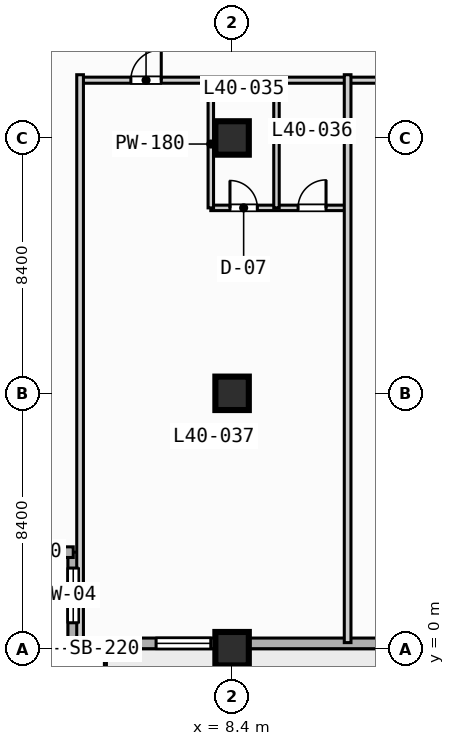
"""IFC4 building model, lengths in metres.
Left out: names, types, materials, properties, quantities, classifications, styles, units other than length and angle.
Written with IfcOpenShell. Run it as: python <this file> out.ifc"""

import sys

from ifc_helpers import new_model, si_unit, direction, frame, frame_2d, origin, origin_2d, place, context, subcontext, project, spatial, rectangle, extrude, element, fill, save


model = new_model("IFC4")
c1 = context("Model", 3, precision=1e-05, world=origin(), true_north=direction((0.0, 1.0)))
c2 = subcontext(c1, "Body", "Model", "MODEL_VIEW")
j1 = project(units=[si_unit("LENGTHUNIT", "METRE"), si_unit("PLANEANGLEUNIT", "RADIAN")], contexts=[c1])
p1 = place(None, origin())
s1 = spatial("IfcSite", under=j1, at=p1, CompositionType="ELEMENT")
p2 = place(p1, origin())
s2 = spatial("IfcBuilding", under=s1, at=p2, CompositionType="ELEMENT")
p3 = place(p2, frame((0.0, 0.0, 168.0)))
s3 = spatial("IfcBuildingStorey", under=s2, at=p3, CompositionType="ELEMENT", Elevation=168.0)
for number, where, z_axis, x_axis in (
    (1, (8.4, 0.0, 0.0), (0.0, 0.0, 1.0), (1.0, 0.0, 0.0)),
    (2, (8.4, 8.4, 0.0), (0.0, 0.0, 1.0), (1.0, 0.0, 0.0)),
    (3, (8.4, 16.8, 0.0), (0.0, 0.0, 1.0), (1.0, 0.0, 0.0)),
):
    element("IfcColumn", number, at=place(p3, frame(where, z_axis=z_axis, x_axis=x_axis)), inside=s3, PredefinedType="COLUMN", context=c2, shape_type="SweptSolid", body=[
        extrude(rectangle(XDim=1.1, YDim=1.1, at=origin_2d()), origin(), (0.0, 0.0, 1.0), 3.7),
    ])
p4 = place(p3, frame((3.175, 0.175, 0.0), z_axis=(0.0, 0.0, 1.0), x_axis=(0.0, 1.0, 0.0)))
e4 = element("IfcWall", 4, at=p4, inside=s3, PredefinedType="STANDARD", context=c2, shape_type="SweptSolid", body=[
    extrude(rectangle(XDim=3.0, YDim=0.35, at=frame_2d((1.5, 0.0))), origin(), (0.0, 0.0, 1.0), 3.47),
])
p5 = place(p4, frame((0.677, 0.0, 0.85)))
e5 = element("IfcOpeningElement", 5, at=p5, cuts=e4, PredefinedType="OPENING", context=c2, shape_type="SweptSolid", body=[
    extrude(rectangle(XDim=1.8, YDim=1.8, at=frame_2d((0.9, 0.9))), frame((0.0, 0.185, 0.0), z_axis=(0.0, -1.0, 0.0), x_axis=(1.0, 0.0, 0.0)), (0.0, 0.0, 1.0), 0.37),
])
p6 = place(p3, frame((3.175, 3.175, 0.0), z_axis=(0.0, 0.0, 1.0), x_axis=(-1.0, 0.0, 0.0)))
e6 = element("IfcWall", 6, at=p6, inside=s3, PredefinedType="STANDARD", context=c2, shape_type="SweptSolid", body=[
    extrude(rectangle(XDim=3.0, YDim=0.35, at=frame_2d((1.5, 0.0))), origin(), (0.0, 0.0, 1.0), 3.47),
])
p7 = place(p3, frame((72.425, 0.175, 0.0), z_axis=(0.0, 0.0, 1.0), x_axis=(-1.0, 0.0, 0.0)))
e7 = element("IfcWall", 7, at=p7, inside=s3, PredefinedType="STANDARD", context=c2, shape_type="SweptSolid", body=[
    extrude(rectangle(XDim=69.25, YDim=0.35, at=frame_2d((34.625, 0.0))), origin(), (0.0, 0.0, 1.0), 3.47),
])
p8 = place(p7, frame((51.725, 0.0, 0.0)))
e8 = element("IfcOpeningElement", 8, at=p8, cuts=e7, PredefinedType="OPENING", context=c2, shape_type="SweptSolid", body=[
    extrude(rectangle(XDim=1.4, YDim=2.2, at=frame_2d((0.7, 1.1))), frame((0.0, 0.185, 0.0), z_axis=(0.0, -1.0, 0.0), x_axis=(1.0, 0.0, 0.0)), (0.0, 0.0, 1.0), 0.37),
])
p9 = place(p7, frame((33.725, 0.0, 0.85)))
e9 = element("IfcOpeningElement", 9, at=p9, cuts=e7, PredefinedType="OPENING", context=c2, shape_type="SweptSolid", body=[
    extrude(rectangle(XDim=1.8, YDim=1.8, at=frame_2d((0.9, 0.9))), frame((0.0, 0.185, 0.0), z_axis=(0.0, -1.0, 0.0), x_axis=(1.0, 0.0, 0.0)), (0.0, 0.0, 1.0), 0.37),
])
p10 = place(p7, frame((25.025, 0.0, 0.85)))
e10 = element("IfcOpeningElement", 10, at=p10, cuts=e7, PredefinedType="OPENING", context=c2, shape_type="SweptSolid", body=[
    extrude(rectangle(XDim=2.4, YDim=1.95, at=frame_2d((1.2, 0.975))), frame((0.0, 0.185, 0.0), z_axis=(0.0, -1.0, 0.0), x_axis=(1.0, 0.0, 0.0)), (0.0, 0.0, 1.0), 0.37),
])
p11 = place(p7, frame((8.225, 0.0, 0.85)))
e11 = element("IfcOpeningElement", 11, at=p11, cuts=e7, PredefinedType="OPENING", context=c2, shape_type="SweptSolid", body=[
    extrude(rectangle(XDim=2.4, YDim=1.95, at=frame_2d((1.2, 0.975))), frame((0.0, 0.185, 0.0), z_axis=(0.0, -1.0, 0.0), x_axis=(1.0, 0.0, 0.0)), (0.0, 0.0, 1.0), 0.37),
])
p12 = place(p7, frame((64.725, 0.0, 0.85)))
e12 = element("IfcOpeningElement", 12, at=p12, cuts=e7, PredefinedType="OPENING", context=c2, shape_type="SweptSolid", body=[
    extrude(rectangle(XDim=1.8, YDim=1.8, at=frame_2d((0.9, 0.9))), frame((0.0, 0.185, 0.0), z_axis=(0.0, -1.0, 0.0), x_axis=(1.0, 0.0, 0.0)), (0.0, 0.0, 1.0), 0.37),
])
p13 = place(p7, frame((44.675, 0.0, 0.85)))
e13 = element("IfcOpeningElement", 13, at=p13, cuts=e7, PredefinedType="OPENING", context=c2, shape_type="SweptSolid", body=[
    extrude(rectangle(XDim=1.8, YDim=1.8, at=frame_2d((0.9, 0.9))), frame((0.0, 0.185, 0.0), z_axis=(0.0, -1.0, 0.0), x_axis=(1.0, 0.0, 0.0)), (0.0, 0.0, 1.0), 0.37),
])
p14 = place(p3, frame((3.4, 18.7, 0.0), z_axis=(0.0, 0.0, 1.0), x_axis=(1.0, 0.0, 0.0)))
e14 = element("IfcWall", 14, at=p14, inside=s3, PredefinedType="PARTITIONING", context=c2, shape_type="SweptSolid", body=[
    extrude(rectangle(XDim=35.8, YDim=0.2, at=frame_2d((17.9, 0.0))), origin(), (0.0, 0.0, 1.0), 3.47),
])
p15 = place(p14, frame((1.67, 0.0, 0.0)))
e15 = element("IfcOpeningElement", 15, at=p15, cuts=e14, PredefinedType="OPENING", context=c2, shape_type="SweptSolid", body=[
    extrude(rectangle(XDim=1.0, YDim=2.15, at=frame_2d((0.5, 1.075))), frame((0.0, 0.11, 0.0), z_axis=(0.0, -1.0, 0.0), x_axis=(1.0, 0.0, 0.0)), (0.0, 0.0, 1.0), 0.22),
])
p16 = place(p14, frame((10.57, 0.0, 0.0)))
e16 = element("IfcOpeningElement", 16, at=p16, cuts=e14, PredefinedType="OPENING", context=c2, shape_type="SweptSolid", body=[
    extrude(rectangle(XDim=1.0, YDim=2.15, at=frame_2d((0.5, 1.075))), frame((0.0, 0.11, 0.0), z_axis=(0.0, -1.0, 0.0), x_axis=(1.0, 0.0, 0.0)), (0.0, 0.0, 1.0), 0.22),
])
p17 = place(p14, frame((19.47, 0.0, 0.0)))
e17 = element("IfcOpeningElement", 17, at=p17, cuts=e14, PredefinedType="OPENING", context=c2, shape_type="SweptSolid", body=[
    extrude(rectangle(XDim=1.0, YDim=2.15, at=frame_2d((0.5, 1.075))), frame((0.0, 0.11, 0.0), z_axis=(0.0, -1.0, 0.0), x_axis=(1.0, 0.0, 0.0)), (0.0, 0.0, 1.0), 0.22),
])
p18 = place(p14, frame((28.22, 0.0, 0.0)))
e18 = element("IfcOpeningElement", 18, at=p18, cuts=e14, PredefinedType="OPENING", context=c2, shape_type="SweptSolid", body=[
    extrude(rectangle(XDim=1.0, YDim=2.15, at=frame_2d((0.5, 1.075))), frame((0.0, 0.11, 0.0), z_axis=(0.0, -1.0, 0.0), x_axis=(1.0, 0.0, 0.0)), (0.0, 0.0, 1.0), 0.22),
])
p19 = place(p3, frame((3.4, 0.2, 0.0), z_axis=(0.0, 0.0, 1.0), x_axis=(0.0, 1.0, 0.0)))
e19 = element("IfcWall", 19, at=p19, inside=s3, PredefinedType="PARTITIONING", context=c2, shape_type="SweptSolid", body=[
    extrude(rectangle(XDim=18.68, YDim=0.22, at=frame_2d((9.34, 0.0))), origin(), (0.0, 0.0, 1.0), 3.47),
])
p20 = place(p3, frame((7.7, 14.5, 0.0), z_axis=(0.0, 0.0, 1.0), x_axis=(1.0, 0.0, 0.0)))
e20 = element("IfcWall", 20, at=p20, inside=s3, PredefinedType="PLUMBINGWALL", context=c2, shape_type="SweptSolid", body=[
    extrude(rectangle(XDim=4.5, YDim=0.18, at=frame_2d((2.25, 0.0))), origin(), (0.0, 0.0, 1.0), 3.47),
])
p21 = place(p20, frame((0.63, 0.0, 0.0)))
e21 = element("IfcOpeningElement", 21, at=p21, cuts=e20, PredefinedType="OPENING", context=c2, shape_type="SweptSolid", body=[
    extrude(rectangle(XDim=0.9, YDim=2.1, at=frame_2d((0.45, 1.05))), frame((0.0, 0.1, 0.0), z_axis=(0.0, -1.0, 0.0), x_axis=(1.0, 0.0, 0.0)), (0.0, 0.0, 1.0), 0.2),
])
p22 = place(p20, frame((2.87, 0.0, 0.0)))
e22 = element("IfcOpeningElement", 22, at=p22, cuts=e20, PredefinedType="OPENING", context=c2, shape_type="SweptSolid", body=[
    extrude(rectangle(XDim=0.92, YDim=2.1, at=frame_2d((0.46, 1.05))), frame((0.0, 0.1, 0.0), z_axis=(0.0, -1.0, 0.0), x_axis=(1.0, 0.0, 0.0)), (0.0, 0.0, 1.0), 0.2),
])
for number, where, z_axis, x_axis in (
    (23, (7.7, 14.5, 0.0), (0.0, 0.0, 1.0), (0.0, 1.0, 0.0)),
    (24, (9.86, 14.5, 0.0), (0.0, 0.0, 1.0), (0.0, 1.0, 0.0)),
):
    element("IfcWall", number, at=place(p3, frame(where, z_axis=z_axis, x_axis=x_axis)), inside=s3, PredefinedType="PLUMBINGWALL", context=c2, shape_type="SweptSolid", body=[
        extrude(rectangle(XDim=4.2, YDim=0.18, at=frame_2d((2.1, 0.0))), origin(), (0.0, 0.0, 1.0), 3.47),
    ])
p23 = place(p3, frame((12.2, 0.2, 0.0), z_axis=(0.0, 0.0, 1.0), x_axis=(0.0, 1.0, 0.0)))
e25 = element("IfcWall", 25, at=p23, inside=s3, PredefinedType="PARTITIONING", context=c2, shape_type="SweptSolid", body=[
    extrude(rectangle(XDim=18.68, YDim=0.22, at=frame_2d((9.34, 0.0))), origin(), (0.0, 0.0, 1.0), 3.47),
])
p24 = place(p5, origin())
e26 = element("IfcWindow", 26, at=p24, inside=s3, PartitioningType="SINGLE_PANEL", PredefinedType="WINDOW", context=c2, shape_type="SweptSolid", body=[
    extrude(rectangle(XDim=1.8, YDim=1.8, at=frame_2d((0.9, 0.9))), frame((0.0, 0.03, 0.0), z_axis=(0.0, -1.0, 0.0), x_axis=(1.0, 0.0, 0.0)), (0.0, 0.0, 1.0), 0.06),
])
fill(e5, e26)
p25 = place(p12, origin())
e27 = element("IfcWindow", 27, at=p25, inside=s3, PartitioningType="SINGLE_PANEL", PredefinedType="WINDOW", context=c2, shape_type="SweptSolid", body=[
    extrude(rectangle(XDim=1.8, YDim=1.8, at=frame_2d((0.9, 0.9))), frame((0.0, 0.03, 0.0), z_axis=(0.0, -1.0, 0.0), x_axis=(1.0, 0.0, 0.0)), (0.0, 0.0, 1.0), 0.06),
])
fill(e12, e27)
p26 = place(p15, origin())
e28 = element("IfcDoor", 28, at=p26, inside=s3, OperationType="SINGLE_SWING_RIGHT", PredefinedType="DOOR", context=c2, shape_type="SweptSolid", body=[
    extrude(rectangle(XDim=1.0, YDim=2.15, at=frame_2d((0.5, 1.075))), frame((0.0, 0.025, 0.0), z_axis=(0.0, -1.0, 0.0), x_axis=(1.0, 0.0, 0.0)), (0.0, 0.0, 1.0), 0.05),
])
fill(e15, e28)
p27 = place(p21, origin())
e29 = element("IfcDoor", 29, at=p27, inside=s3, OperationType="SINGLE_SWING_LEFT", PredefinedType="DOOR", context=c2, shape_type="SweptSolid", body=[
    extrude(rectangle(XDim=0.9, YDim=2.1, at=frame_2d((0.45, 1.05))), frame((0.0, 0.025, 0.0), z_axis=(0.0, -1.0, 0.0), x_axis=(1.0, 0.0, 0.0)), (0.0, 0.0, 1.0), 0.05),
])
fill(e21, e29)
p28 = place(p22, origin())
e30 = element("IfcDoor", 30, at=p28, inside=s3, OperationType="SINGLE_SWING_RIGHT", PredefinedType="DOOR", context=c2, shape_type="SweptSolid", body=[
    extrude(rectangle(XDim=0.92, YDim=2.1, at=frame_2d((0.46, 1.05))), frame((0.0, 0.025, 0.0), z_axis=(0.0, -1.0, 0.0), x_axis=(1.0, 0.0, 0.0)), (0.0, 0.0, 1.0), 0.05),
])
fill(e22, e30)
save(model, sys.argv[1])
